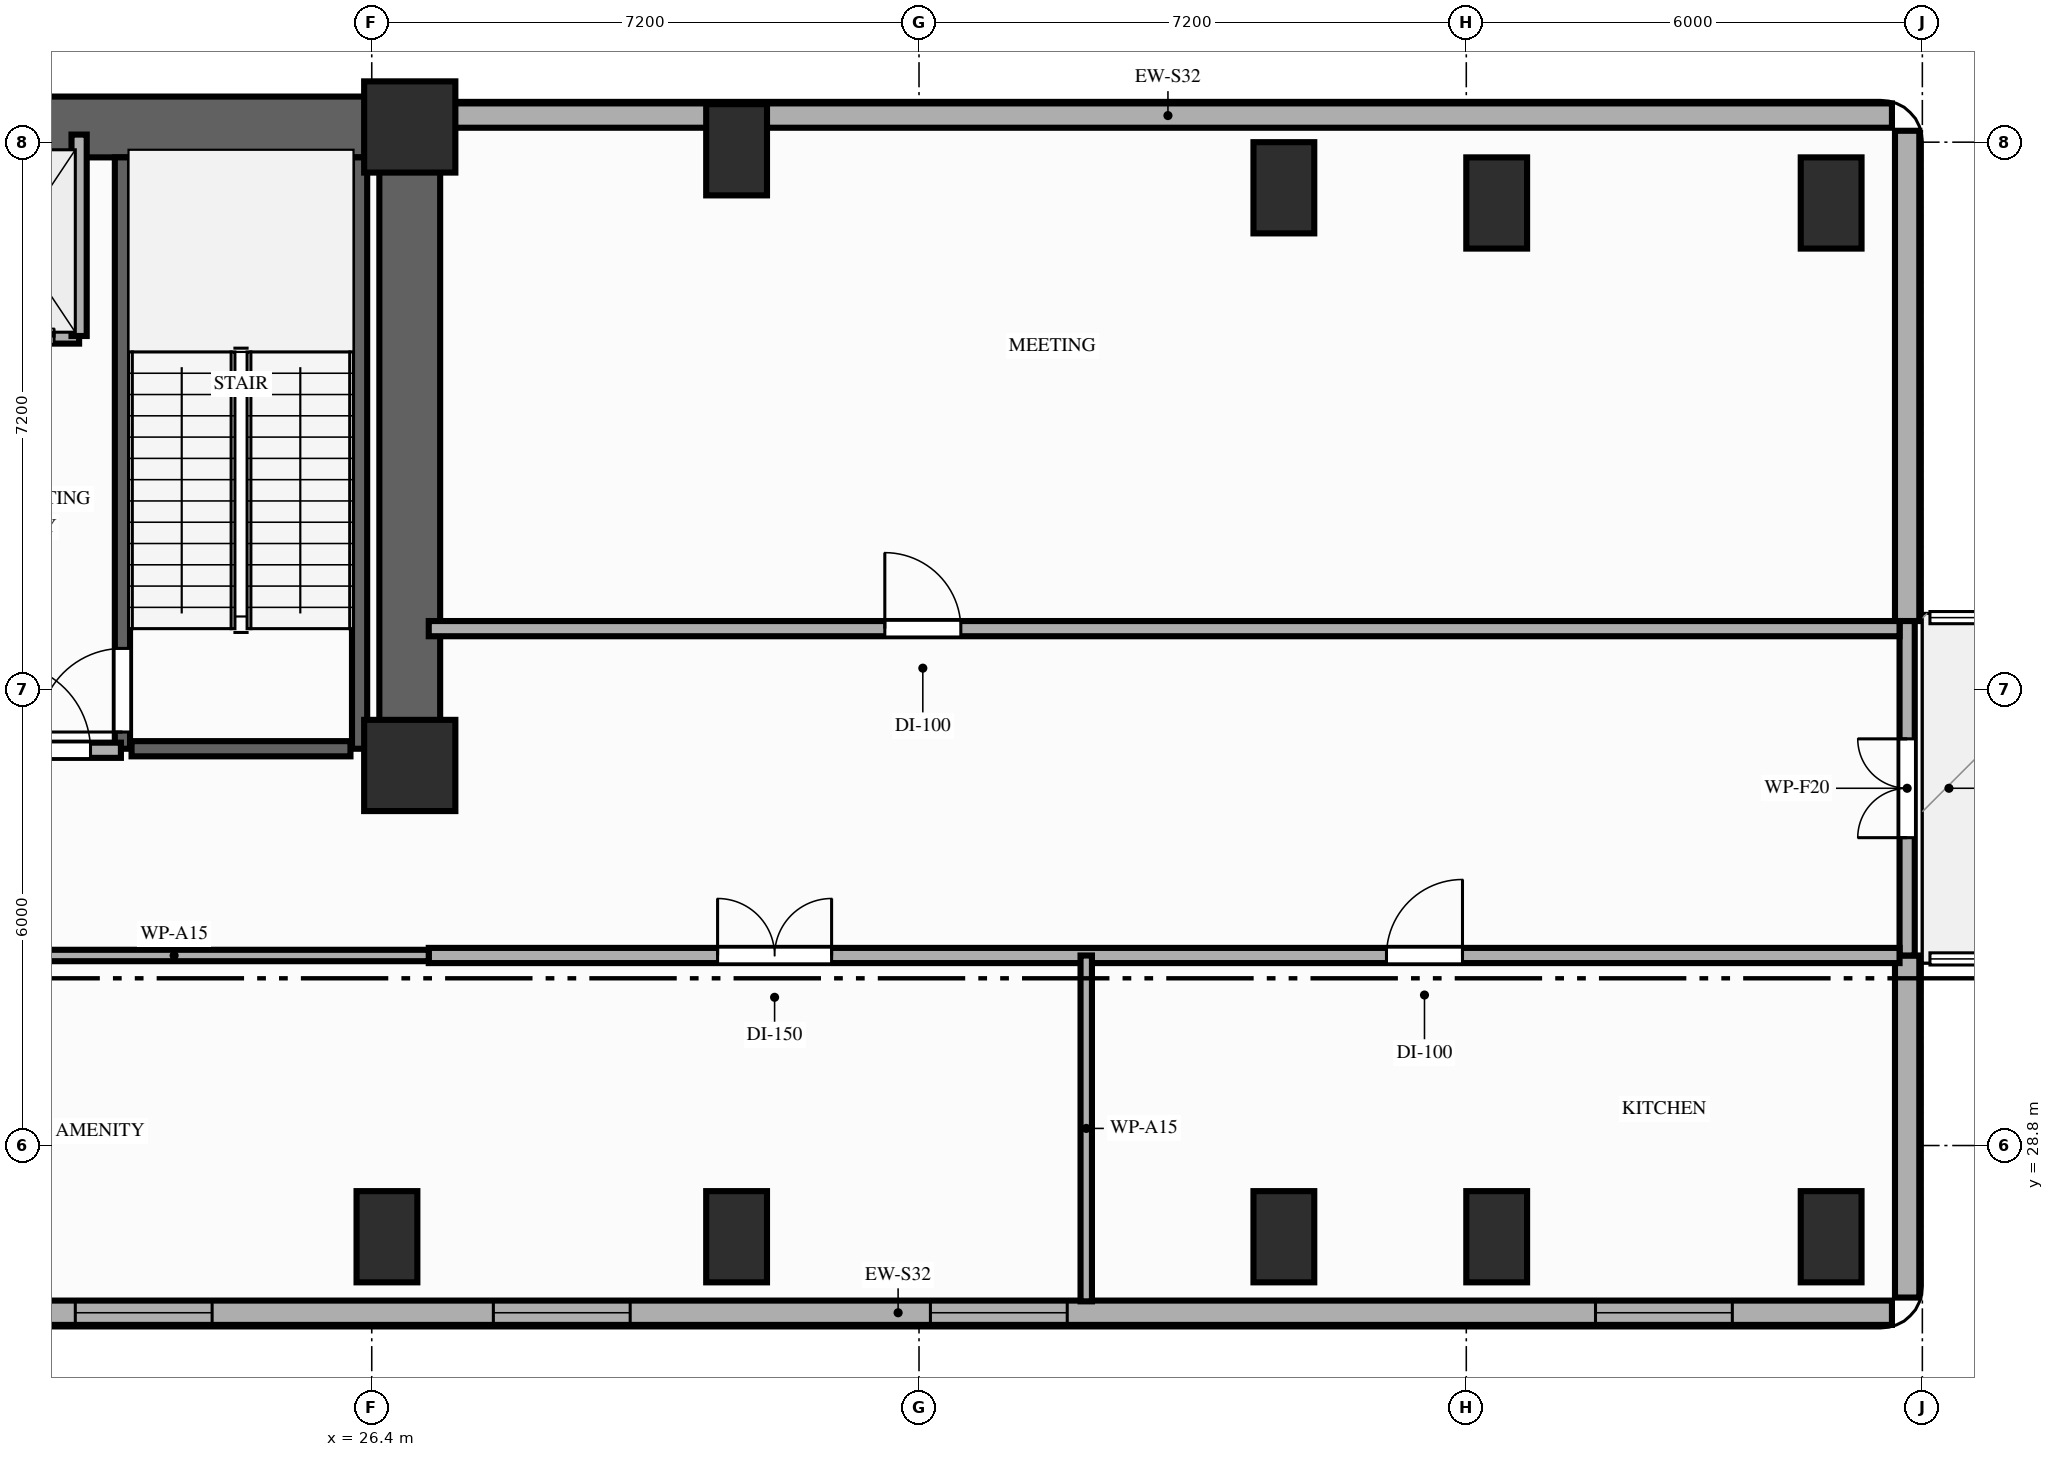
"""IFC4 building model, lengths in metres.
Left out: names, types, materials, properties, quantities, classifications, styles, units other than length and angle.
Written with IfcOpenShell. Run it as: python <this file> out.ifc"""

import sys

from ifc_helpers import new_model, si_unit, direction, frame, frame_2d, origin, origin_2d, place, context, subcontext, project, spatial, rectangle, extrude, element, fill, save


model = new_model("IFC4")
c1 = context("Model", 3, precision=1e-05, world=origin(), true_north=direction((0.0, 1.0)))
c2 = subcontext(c1, "Body", "Model", "MODEL_VIEW")
j1 = project(units=[si_unit("LENGTHUNIT", "METRE"), si_unit("PLANEANGLEUNIT", "RADIAN")], contexts=[c1])
p1 = place(None, origin())
s1 = spatial("IfcSite", under=j1, at=p1, CompositionType="ELEMENT")
p2 = place(p1, origin())
s2 = spatial("IfcBuilding", under=s1, at=p2, CompositionType="ELEMENT")
p3 = place(p2, frame((0.0, 0.0, 102.6)))
s3 = spatial("IfcBuildingStorey", under=s2, at=p3, CompositionType="ELEMENT", Elevation=102.6)
for number, where, z_axis, x_axis in (
    (1, (26.9, 33.8, 0.0), (0.0, 0.0, 1.0), (1.0, 0.0, 0.0)),
    (2, (26.9, 42.2, 0.0), (0.0, 0.0, 1.0), (1.0, 0.0, 0.0)),
):
    element("IfcColumn", number, at=place(p3, frame(where, z_axis=z_axis, x_axis=x_axis)), inside=s3, PredefinedType="COLUMN", context=c2, shape_type="SweptSolid", body=[
        extrude(rectangle(XDim=1.2, YDim=1.2, at=origin_2d()), origin(), (0.0, 0.0, 1.0), 4.8),
    ])
for number, where, z_axis, x_axis in (
    (3, (26.6, 27.6, 0.0), (0.0, 0.0, 1.0), (1.0, 0.0, 0.0)),
    (4, (31.2, 27.6, 0.0), (0.0, 0.0, 1.0), (1.0, 0.0, 0.0)),
    (5, (31.2, 41.9, 0.0), (0.0, 0.0, 1.0), (1.0, 0.0, 0.0)),
    (6, (38.4, 27.6, 0.0), (0.0, 0.0, 1.0), (1.0, 0.0, 0.0)),
    (7, (38.4, 41.4, 0.0), (0.0, 0.0, 1.0), (1.0, 0.0, 0.0)),
    (8, (41.2, 27.6, 0.0), (0.0, 0.0, 1.0), (1.0, 0.0, 0.0)),
    (9, (41.2, 41.2, 0.0), (0.0, 0.0, 1.0), (1.0, 0.0, 0.0)),
    (10, (45.6, 27.6, 0.0), (0.0, 0.0, 1.0), (1.0, 0.0, 0.0)),
    (11, (45.6, 41.2, 0.0), (0.0, 0.0, 1.0), (1.0, 0.0, 0.0)),
):
    element("IfcColumn", number, at=place(p3, frame(where, z_axis=z_axis, x_axis=x_axis)), inside=s3, PredefinedType="COLUMN", context=c2, shape_type="SweptSolid", body=[
        extrude(rectangle(XDim=0.8, YDim=1.2, at=origin_2d()), origin(), (0.0, 0.0, 1.0), 4.8),
    ])
p4 = place(p3, frame((46.4, 42.35, 0.0), z_axis=(0.0, 0.0, 1.0), x_axis=(-1.0, 0.0, 0.0)))
e12 = element("IfcWall", 12, at=p4, inside=s3, PredefinedType="STANDARD", context=c2, shape_type="SweptSolid", body=[
    extrude(rectangle(XDim=19.05, YDim=0.32, at=frame_2d((9.525, 0.0))), origin(), (0.0, 0.0, 1.0), 3.95),
])
p5 = place(p3, frame((20.25, 26.6, 0.0), z_axis=(0.0, 0.0, 1.0), x_axis=(1.0, 0.0, 0.0)))
e13 = element("IfcWall", 13, at=p5, inside=s3, PredefinedType="STANDARD", context=c2, shape_type="SweptSolid", body=[
    extrude(rectangle(XDim=26.15, YDim=0.32, at=frame_2d((13.075, 0.0))), origin(), (0.0, 0.0, 1.0), 4.26),
])
p6 = place(p5, frame((2.25, 0.0, 0.85)))
e14 = element("IfcOpeningElement", 14, at=p6, cuts=e13, PredefinedType="OPENING", context=c2, shape_type="SweptSolid", body=[
    extrude(rectangle(XDim=1.8, YDim=1.75, at=frame_2d((0.9, 0.875))), frame((0.0, 0.17, 0.0), z_axis=(0.0, -1.0, 0.0), x_axis=(1.0, 0.0, 0.0)), (0.0, 0.0, 1.0), 0.34),
])
p7 = place(p5, frame((7.75, 0.0, 0.85)))
e15 = element("IfcOpeningElement", 15, at=p7, cuts=e13, PredefinedType="OPENING", context=c2, shape_type="SweptSolid", body=[
    extrude(rectangle(XDim=1.8, YDim=1.75, at=frame_2d((0.9, 0.875))), frame((0.0, 0.17, 0.0), z_axis=(0.0, -1.0, 0.0), x_axis=(1.0, 0.0, 0.0)), (0.0, 0.0, 1.0), 0.34),
])
p8 = place(p5, frame((13.5, 0.0, 0.85)))
e16 = element("IfcOpeningElement", 16, at=p8, cuts=e13, PredefinedType="OPENING", context=c2, shape_type="SweptSolid", body=[
    extrude(rectangle(XDim=1.8, YDim=1.75, at=frame_2d((0.9, 0.875))), frame((0.0, 0.17, 0.0), z_axis=(0.0, -1.0, 0.0), x_axis=(1.0, 0.0, 0.0)), (0.0, 0.0, 1.0), 0.34),
])
p9 = place(p5, frame((22.25, 0.0, 0.85)))
e17 = element("IfcOpeningElement", 17, at=p9, cuts=e13, PredefinedType="OPENING", context=c2, shape_type="SweptSolid", body=[
    extrude(rectangle(XDim=1.8, YDim=1.75, at=frame_2d((0.9, 0.875))), frame((0.0, 0.17, 0.0), z_axis=(0.0, -1.0, 0.0), x_axis=(1.0, 0.0, 0.0)), (0.0, 0.0, 1.0), 0.34),
])
p10 = place(p3, frame((46.6, 26.8, 0.0), z_axis=(0.0, 0.0, 1.0), x_axis=(0.0, 1.0, 0.0)))
e18 = element("IfcWall", 18, at=p10, inside=s3, PredefinedType="STANDARD", context=c2, shape_type="SweptSolid", body=[
    extrude(rectangle(XDim=4.5, YDim=0.32, at=frame_2d((2.25, 0.0))), origin(), (0.0, 0.0, 1.0), 4.56),
])
p11 = place(p3, frame((46.6, 35.7, 0.0), z_axis=(0.0, 0.0, 1.0), x_axis=(0.0, 1.0, 0.0)))
e19 = element("IfcWall", 19, at=p11, inside=s3, PredefinedType="STANDARD", context=c2, shape_type="SweptSolid", body=[
    extrude(rectangle(XDim=6.45, YDim=0.32, at=frame_2d((3.225, 0.0))), origin(), (0.0, 0.0, 1.0), 4.56),
])
p12 = place(p3, frame((6.45, 42.2, 0.0), z_axis=(0.0, 0.0, 1.0), x_axis=(1.0, 0.0, 0.0)))
e20 = element("IfcWall", 20, at=p12, inside=s3, PredefinedType="SHEAR", context=c2, shape_type="SweptSolid", body=[
    extrude(rectangle(XDim=20.45, YDim=0.8, at=frame_2d((10.225, 0.0))), origin(), (0.0, 0.0, 1.0), 4.56),
])
p13 = place(p3, frame((26.9, 33.8, 0.0), z_axis=(0.0, 0.0, 1.0), x_axis=(0.0, 1.0, 0.0)))
e21 = element("IfcWall", 21, at=p13, inside=s3, PredefinedType="SHEAR", context=c2, shape_type="SweptSolid", body=[
    extrude(rectangle(XDim=7.95, YDim=0.8, at=frame_2d((3.975, 0.0))), origin(), (0.0, 0.0, 1.0), 4.56),
])
p14 = place(p3, frame((23.12, 34.02, 0.0), z_axis=(0.0, 0.0, 1.0), x_axis=(0.0, 1.0, 0.0)))
e22 = element("IfcWall", 22, at=p14, inside=s3, PredefinedType="SHEAR", context=c2, shape_type="SweptSolid", body=[
    extrude(rectangle(XDim=7.78, YDim=0.2, at=frame_2d((3.89, 0.0))), origin(), (0.0, 0.0, 1.0), 4.56),
])
p15 = place(p14, frame((0.22, 0.0, 0.0)))
e23 = element("IfcOpeningElement", 23, at=p15, cuts=e22, PredefinedType="OPENING", context=c2, shape_type="SweptSolid", body=[
    extrude(rectangle(XDim=1.1, YDim=2.15, at=frame_2d((0.55, 1.075))), frame((0.0, 0.11, 0.0), z_axis=(0.0, -1.0, 0.0), x_axis=(1.0, 0.0, 0.0)), (0.0, 0.0, 1.0), 0.22),
])
p16 = place(p3, frame((26.24, 34.02, 0.0), z_axis=(0.0, 0.0, 1.0), x_axis=(0.0, 1.0, 0.0)))
e24 = element("IfcWall", 24, at=p16, inside=s3, PredefinedType="SHEAR", context=c2, shape_type="SweptSolid", body=[
    extrude(rectangle(XDim=7.78, YDim=0.2, at=frame_2d((3.89, 0.0))), origin(), (0.0, 0.0, 1.0), 4.56),
])
p17 = place(p3, frame((23.24, 34.02, 0.0), z_axis=(0.0, 0.0, 1.0), x_axis=(1.0, 0.0, 0.0)))
e25 = element("IfcWall", 25, at=p17, inside=s3, PredefinedType="SHEAR", context=c2, shape_type="SweptSolid", body=[
    extrude(rectangle(XDim=2.88, YDim=0.2, at=frame_2d((1.44, 0.0))), origin(), (0.0, 0.0, 1.0), 4.56),
])
p18 = place(p3, frame((20.85, 39.45, 0.0), z_axis=(0.0, 0.0, 1.0), x_axis=(1.0, 0.0, 0.0)))
e26 = element("IfcWall", 26, at=p18, inside=s3, PredefinedType="MOVABLE", context=c2, shape_type="SweptSolid", body=[
    extrude(rectangle(XDim=1.7, YDim=0.2, at=frame_2d((0.85, 0.0))), origin(), (0.0, 0.0, 1.0), 4.56),
])
p19 = place(p18, frame((0.32, 0.0, 0.0)))
e27 = element("IfcOpeningElement", 27, at=p19, cuts=e26, PredefinedType="OPENING", context=c2, shape_type="SweptSolid", body=[
    extrude(rectangle(XDim=1.05, YDim=2.15, at=frame_2d((0.525, 1.075))), frame((0.0, 0.11, 0.0), z_axis=(0.0, -1.0, 0.0), x_axis=(1.0, 0.0, 0.0)), (0.0, 0.0, 1.0), 0.22),
])
p20 = place(p3, frame((22.55, 39.45, 0.0), z_axis=(0.0, 0.0, 1.0), x_axis=(0.0, 1.0, 0.0)))
e28 = element("IfcWall", 28, at=p20, inside=s3, PredefinedType="MOVABLE", context=c2, shape_type="SweptSolid", body=[
    extrude(rectangle(XDim=2.65, YDim=0.2, at=frame_2d((1.325, 0.0))), origin(), (0.0, 0.0, 1.0), 3.95),
])
p21 = place(p3, frame((20.5, 34.0, 0.0), z_axis=(0.0, 0.0, 1.0), x_axis=(1.0, 0.0, 0.0)))
e29 = element("IfcWall", 29, at=p21, inside=s3, PredefinedType="PARTITIONING", context=c2, shape_type="SweptSolid", body=[
    extrude(rectangle(XDim=2.6, YDim=0.2, at=frame_2d((1.3, 0.0))), origin(), (0.0, 0.0, 1.0), 3.95),
])
p22 = place(p21, frame((1.05, 0.0, 0.0)))
e30 = element("IfcOpeningElement", 30, at=p22, cuts=e29, PredefinedType="OPENING", context=c2, shape_type="SweptSolid", body=[
    extrude(rectangle(XDim=1.15, YDim=2.15, at=frame_2d((0.575, 1.075))), frame((0.0, 0.11, 0.0), z_axis=(0.0, -1.0, 0.0), x_axis=(1.0, 0.0, 0.0)), (0.0, 0.0, 1.0), 0.22),
])
p23 = place(p3, frame((46.6, 31.3, 0.0), z_axis=(0.0, 0.0, 1.0), x_axis=(0.0, 1.0, 0.0)))
e31 = element("IfcWall", 31, at=p23, inside=s3, PredefinedType="PARTITIONING", context=c2, shape_type="SweptSolid", body=[
    extrude(rectangle(XDim=4.4, YDim=0.2, at=frame_2d((2.2, 0.0))), origin(), (0.0, 0.0, 1.0), 4.56),
])
p24 = place(p23, frame((1.55, 0.0, 0.0)))
e32 = element("IfcOpeningElement", 32, at=p24, cuts=e31, PredefinedType="OPENING", context=c2, shape_type="SweptSolid", body=[
    extrude(rectangle(XDim=1.3, YDim=2.3, at=frame_2d((0.65, 1.15))), frame((0.0, 0.11, 0.0), z_axis=(0.0, -1.0, 0.0), x_axis=(1.0, 0.0, 0.0)), (0.0, 0.0, 1.0), 0.22),
])
p25 = place(p3, frame((27.15, 31.3, 0.0), z_axis=(0.0, 0.0, 1.0), x_axis=(1.0, 0.0, 0.0)))
e33 = element("IfcWall", 33, at=p25, inside=s3, PredefinedType="PARTITIONING", context=c2, shape_type="SweptSolid", body=[
    extrude(rectangle(XDim=19.35, YDim=0.2, at=frame_2d((9.675, 0.0))), origin(), (0.0, 0.0, 1.0), 3.95),
])
p26 = place(p25, frame((3.8, 0.0, 0.0)))
e34 = element("IfcOpeningElement", 34, at=p26, cuts=e33, PredefinedType="OPENING", context=c2, shape_type="SweptSolid", body=[
    extrude(rectangle(XDim=1.5, YDim=2.18, at=frame_2d((0.75, 1.09))), frame((0.0, 0.11, 0.0), z_axis=(0.0, -1.0, 0.0), x_axis=(1.0, 0.0, 0.0)), (0.0, 0.0, 1.0), 0.22),
])
p27 = place(p25, frame((12.6, 0.0, 0.0)))
e35 = element("IfcOpeningElement", 35, at=p27, cuts=e33, PredefinedType="OPENING", context=c2, shape_type="SweptSolid", body=[
    extrude(rectangle(XDim=1.0, YDim=2.15, at=frame_2d((0.5, 1.075))), frame((0.0, 0.11, 0.0), z_axis=(0.0, -1.0, 0.0), x_axis=(1.0, 0.0, 0.0)), (0.0, 0.0, 1.0), 0.22),
])
p28 = place(p3, frame((27.15, 35.6, 0.0), z_axis=(0.0, 0.0, 1.0), x_axis=(1.0, 0.0, 0.0)))
e36 = element("IfcWall", 36, at=p28, inside=s3, PredefinedType="PARTITIONING", context=c2, shape_type="SweptSolid", body=[
    extrude(rectangle(XDim=19.35, YDim=0.2, at=frame_2d((9.675, 0.0))), origin(), (0.0, 0.0, 1.0), 3.95),
])
p29 = place(p28, frame((6.0, 0.0, 0.0)))
e37 = element("IfcOpeningElement", 37, at=p29, cuts=e36, PredefinedType="OPENING", context=c2, shape_type="SweptSolid", body=[
    extrude(rectangle(XDim=1.0, YDim=2.15, at=frame_2d((0.5, 1.075))), frame((0.0, 0.11, 0.0), z_axis=(0.0, -1.0, 0.0), x_axis=(1.0, 0.0, 0.0)), (0.0, 0.0, 1.0), 0.22),
])
p30 = place(p3, frame((20.45, 31.3, 0.0), z_axis=(0.0, 0.0, 1.0), x_axis=(1.0, 0.0, 0.0)))
e38 = element("IfcWall", 38, at=p30, inside=s3, PredefinedType="PARTITIONING", context=c2, shape_type="SweptSolid", body=[
    extrude(rectangle(XDim=6.7, YDim=0.15, at=frame_2d((3.35, 0.0))), origin(), (0.0, 0.0, 1.0), 4.56),
])
p31 = place(p3, frame((35.8, 26.75, 0.0), z_axis=(0.0, 0.0, 1.0), x_axis=(0.0, 1.0, 0.0)))
e39 = element("IfcWall", 39, at=p31, inside=s3, PredefinedType="PARTITIONING", context=c2, shape_type="SweptSolid", body=[
    extrude(rectangle(XDim=4.55, YDim=0.15, at=frame_2d((2.275, 0.0))), origin(), (0.0, 0.0, 1.0), 3.95),
])
p32 = place(p6, origin())
e40 = element("IfcWindow", 40, at=p32, inside=s3, PartitioningType="SINGLE_PANEL", PredefinedType="WINDOW", context=c2, shape_type="SweptSolid", body=[
    extrude(rectangle(XDim=1.8, YDim=1.75, at=frame_2d((0.9, 0.875))), frame((0.0, 0.03, 0.0), z_axis=(0.0, -1.0, 0.0), x_axis=(1.0, 0.0, 0.0)), (0.0, 0.0, 1.0), 0.06),
])
fill(e14, e40)
p33 = place(p7, origin())
e41 = element("IfcWindow", 41, at=p33, inside=s3, PartitioningType="SINGLE_PANEL", PredefinedType="WINDOW", context=c2, shape_type="SweptSolid", body=[
    extrude(rectangle(XDim=1.8, YDim=1.75, at=frame_2d((0.9, 0.875))), frame((0.0, 0.03, 0.0), z_axis=(0.0, -1.0, 0.0), x_axis=(1.0, 0.0, 0.0)), (0.0, 0.0, 1.0), 0.06),
])
fill(e15, e41)
p34 = place(p8, origin())
e42 = element("IfcWindow", 42, at=p34, inside=s3, PartitioningType="SINGLE_PANEL", PredefinedType="WINDOW", context=c2, shape_type="SweptSolid", body=[
    extrude(rectangle(XDim=1.8, YDim=1.75, at=frame_2d((0.9, 0.875))), frame((0.0, 0.03, 0.0), z_axis=(0.0, -1.0, 0.0), x_axis=(1.0, 0.0, 0.0)), (0.0, 0.0, 1.0), 0.06),
])
fill(e16, e42)
p35 = place(p9, origin())
e43 = element("IfcWindow", 43, at=p35, inside=s3, PartitioningType="SINGLE_PANEL", PredefinedType="WINDOW", context=c2, shape_type="SweptSolid", body=[
    extrude(rectangle(XDim=1.8, YDim=1.75, at=frame_2d((0.9, 0.875))), frame((0.0, 0.03, 0.0), z_axis=(0.0, -1.0, 0.0), x_axis=(1.0, 0.0, 0.0)), (0.0, 0.0, 1.0), 0.06),
])
fill(e17, e43)
p36 = place(p15, origin())
e44 = element("IfcDoor", 44, at=p36, inside=s3, OperationType="SINGLE_SWING_LEFT", PredefinedType="DOOR", context=c2, shape_type="SweptSolid", body=[
    extrude(rectangle(XDim=1.1, YDim=2.15, at=frame_2d((0.55, 1.075))), frame((0.0, 0.025, 0.0), z_axis=(0.0, -1.0, 0.0), x_axis=(1.0, 0.0, 0.0)), (0.0, 0.0, 1.0), 0.05),
])
fill(e23, e44)
p37 = place(p19, origin())
e45 = element("IfcDoor", 45, at=p37, inside=s3, OperationType="SLIDING_TO_LEFT", PredefinedType="DOOR", context=c2, shape_type="SweptSolid", body=[
    extrude(rectangle(XDim=1.05, YDim=2.15, at=frame_2d((0.525, 1.075))), frame((0.0, 0.025, 0.0), z_axis=(0.0, -1.0, 0.0), x_axis=(1.0, 0.0, 0.0)), (0.0, 0.0, 1.0), 0.05),
])
fill(e27, e45)
p38 = place(p22, origin())
e46 = element("IfcDoor", 46, at=p38, inside=s3, OperationType="SINGLE_SWING_LEFT", PredefinedType="DOOR", context=c2, shape_type="SweptSolid", body=[
    extrude(rectangle(XDim=1.15, YDim=2.15, at=frame_2d((0.575, 1.075))), frame((0.0, 0.025, 0.0), z_axis=(0.0, -1.0, 0.0), x_axis=(1.0, 0.0, 0.0)), (0.0, 0.0, 1.0), 0.05),
])
fill(e30, e46)
p39 = place(p24, origin())
e47 = element("IfcDoor", 47, at=p39, inside=s3, OperationType="DOUBLE_SWING_LEFT", PredefinedType="DOOR", context=c2, shape_type="SweptSolid", body=[
    extrude(rectangle(XDim=1.3, YDim=2.3, at=frame_2d((0.65, 1.15))), frame((0.0, 0.025, 0.0), z_axis=(0.0, -1.0, 0.0), x_axis=(1.0, 0.0, 0.0)), (0.0, 0.0, 1.0), 0.05),
])
fill(e32, e47)
p40 = place(p26, origin())
e48 = element("IfcDoor", 48, at=p40, inside=s3, OperationType="DOUBLE_DOOR_SINGLE_SWING", PredefinedType="DOOR", context=c2, shape_type="SweptSolid", body=[
    extrude(rectangle(XDim=1.5, YDim=2.18, at=frame_2d((0.75, 1.09))), frame((0.0, 0.025, 0.0), z_axis=(0.0, -1.0, 0.0), x_axis=(1.0, 0.0, 0.0)), (0.0, 0.0, 1.0), 0.05),
])
fill(e34, e48)
p41 = place(p27, origin())
e49 = element("IfcDoor", 49, at=p41, inside=s3, OperationType="SINGLE_SWING_RIGHT", PredefinedType="DOOR", context=c2, shape_type="SweptSolid", body=[
    extrude(rectangle(XDim=1.0, YDim=2.15, at=frame_2d((0.5, 1.075))), frame((0.0, 0.025, 0.0), z_axis=(0.0, -1.0, 0.0), x_axis=(1.0, 0.0, 0.0)), (0.0, 0.0, 1.0), 0.05),
])
fill(e35, e49)
p42 = place(p29, origin())
e50 = element("IfcDoor", 50, at=p42, inside=s3, OperationType="SINGLE_SWING_LEFT", PredefinedType="DOOR", context=c2, shape_type="SweptSolid", body=[
    extrude(rectangle(XDim=1.0, YDim=2.15, at=frame_2d((0.5, 1.075))), frame((0.0, 0.025, 0.0), z_axis=(0.0, -1.0, 0.0), x_axis=(1.0, 0.0, 0.0)), (0.0, 0.0, 1.0), 0.05),
])
fill(e37, e50)
save(model, sys.argv[1])
